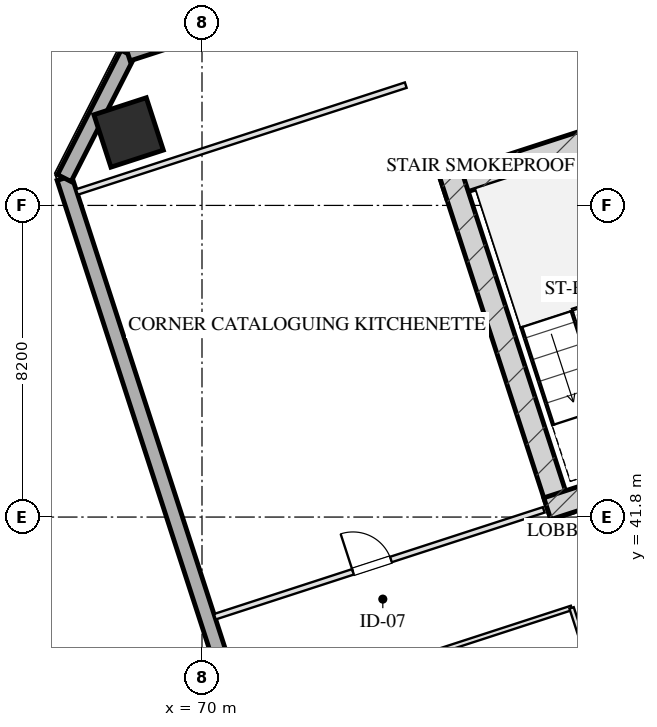
"""IFC4 building model, lengths in metres.
Left out: names, types, materials, properties, quantities, classifications, styles, units other than length and angle.
Written with IfcOpenShell. Run it as: python <this file> out.ifc"""

import sys

from ifc_helpers import new_model, si_unit, direction, frame, frame_2d, origin, origin_2d, place, context, subcontext, project, spatial, rectangle, hollow_rectangle, extrude, element, fill, save


model = new_model("IFC4")
c1 = context("Model", 3, precision=1e-05, world=origin(), true_north=direction((0.0, 1.0)))
c2 = subcontext(c1, "Body", "Model", "MODEL_VIEW")
j1 = project(units=[si_unit("LENGTHUNIT", "METRE"), si_unit("PLANEANGLEUNIT", "RADIAN")], contexts=[c1])
p1 = place(None, origin())
s1 = spatial("IfcSite", under=j1, at=p1, CompositionType="ELEMENT")
p2 = place(p1, origin())
s2 = spatial("IfcBuilding", under=s1, at=p2, CompositionType="ELEMENT")
p3 = place(p2, frame((0.0, 0.0, 117.3)))
s3 = spatial("IfcBuildingStorey", under=s2, at=p3, CompositionType="ELEMENT", Elevation=117.3)
p4 = place(p3, frame((76.344, 50.466, 0.0), z_axis=(0.0, 0.0, 1.0), x_axis=(0.951055727519, 0.309019421968, 0.0)))
e1 = element("IfcWall", 1, at=p4, inside=s3, PredefinedType="SHEAR", context=c2, shape_type="SweptSolid", body=[
    extrude(rectangle(XDim=16.4, YDim=0.6, at=frame_2d((8.2, 0.0))), origin(), (0.0, 0.0, 1.0), 3.45),
])
p5 = place(p3, frame((79.466, 41.828, 0.0), z_axis=(0.0, 0.0, 1.0), x_axis=(-0.309041232772, 0.951048640421, 0.0)))
e2 = element("IfcWall", 2, at=p5, inside=s3, PredefinedType="SHEAR", context=c2, shape_type="SweptSolid", body=[
    extrude(rectangle(XDim=9.48, YDim=0.6, at=frame_2d((4.74, 0.0))), origin(), (0.0, 0.0, 1.0), 3.45),
])
p6 = place(p3, frame((79.087, 42.021, 0.0), z_axis=(0.0, 0.0, 1.0), x_axis=(0.951062550203, 0.3089984233, 0.0)))
e3 = element("IfcWall", 3, at=p6, inside=s3, PredefinedType="SHEAR", context=c2, shape_type="SweptSolid", body=[
    extrude(rectangle(XDim=4.22, YDim=0.6, at=frame_2d((2.11, 0.0))), origin(), (0.0, 0.0, 1.0), 3.45),
])
p7 = place(p3, frame((68.069, 51.92, 0.0), z_axis=(0.0, 0.0, 1.0), x_axis=(0.951056516295, 0.309016994375, 0.0)))
e4 = element("IfcColumn", 4, at=p7, inside=s3, PredefinedType="COLUMN", context=c2, shape_type="SweptSolid", body=[
    extrude(hollow_rectangle(XDim=1.45, YDim=1.45, WallThickness=0.05, at=origin_2d()), origin(), (0.0, 0.0, 1.0), 3.451),
])
p8 = place(p3, frame((80.716, 6.59, 0.0), z_axis=(0.0, 0.0, 1.0), x_axis=(-0.309017542002, 0.95105633836, 0.0)))
e5 = element("IfcWall", 5, at=p8, inside=s3, PredefinedType="SOLIDWALL", context=c2, shape_type="SweptSolid", body=[
    extrude(rectangle(XDim=46.4, YDim=0.4, at=frame_2d((23.2, 0.0))), origin(), (0.0, 0.0, 1.0), 2.61),
])
p9 = place(p8, frame((15.6, 0.0, 0.75)))
e6 = element("IfcOpeningElement", 6, at=p9, cuts=e5, PredefinedType="OPENING", context=c2, shape_type="SweptSolid", body=[
    extrude(rectangle(XDim=2.4, YDim=1.46, at=frame_2d((1.2, 0.73))), frame((0.0, 0.21, 0.0), z_axis=(0.0, -1.0, 0.0), x_axis=(1.0, 0.0, 0.0)), (0.0, 0.0, 1.0), 0.42),
])
p10 = place(p8, frame((28.4, 0.0, 0.75)))
e7 = element("IfcOpeningElement", 7, at=p10, cuts=e5, PredefinedType="OPENING", context=c2, shape_type="SweptSolid", body=[
    extrude(rectangle(XDim=2.4, YDim=1.46, at=frame_2d((1.2, 0.73))), frame((0.0, 0.21, 0.0), z_axis=(0.0, -1.0, 0.0), x_axis=(1.0, 0.0, 0.0)), (0.0, 0.0, 1.0), 0.42),
])
p11 = place(p3, frame((66.377, 50.719, 0.0), z_axis=(0.0, 0.0, 1.0), x_axis=(0.454026238093, 0.890988313685, 0.0)))
e8 = element("IfcWall", 8, at=p11, inside=s3, PredefinedType="SOLIDWALL", context=c2, shape_type="SweptSolid", body=[
    extrude(rectangle(XDim=3.677, YDim=0.4, at=frame_2d((1.838, 0.0))), origin(), (0.0, 0.0, 1.0), 2.61),
])
p12 = place(p3, frame((68.047, 53.995, 0.0), z_axis=(0.0, 0.0, 1.0), x_axis=(0.95105505922, 0.309021478754, 0.0)))
e9 = element("IfcWall", 9, at=p12, inside=s3, PredefinedType="SOLIDWALL", context=c2, shape_type="SweptSolid", body=[
    extrude(rectangle(XDim=29.4, YDim=0.4, at=frame_2d((14.7, 0.0))), origin(), (0.0, 0.0, 1.0), 2.61),
])
p13 = place(p3, frame((66.707, 50.352, 0.0), z_axis=(0.0, 0.0, 1.0), x_axis=(0.951057133767, 0.309015093986, 0.0)))
e10 = element("IfcWall", 10, at=p13, inside=s3, PredefinedType="PARTITIONING", context=c2, shape_type="SweptSolid", body=[
    extrude(rectangle(XDim=9.1, YDim=0.15, at=frame_2d((4.55, 0.0))), origin(), (0.0, 0.0, 1.0), 3.175),
])
p14 = place(p3, frame((70.338, 39.177, 0.0), z_axis=(0.0, 0.0, 1.0), x_axis=(0.951059695568, 0.309007209409, 0.0)))
e11 = element("IfcWall", 11, at=p14, inside=s3, PredefinedType="PARTITIONING", context=c2, shape_type="SweptSolid", body=[
    extrude(rectangle(XDim=9.1, YDim=0.15, at=frame_2d((4.55, 0.0))), origin(), (0.0, 0.0, 1.0), 3.175),
])
p15 = place(p14, frame((3.822, 0.0, 0.0)))
e12 = element("IfcOpeningElement", 12, at=p15, cuts=e11, PredefinedType="OPENING", context=c2, shape_type="SweptSolid", body=[
    extrude(rectangle(XDim=1.05, YDim=2.05, at=frame_2d((0.525, 1.025))), frame((0.0, 0.085, 0.0), z_axis=(0.0, -1.0, 0.0), x_axis=(1.0, 0.0, 0.0)), (0.0, 0.0, 1.0), 0.17),
])
p16 = place(p3, frame((71.166, 36.629, 0.0), z_axis=(0.0, 0.0, 1.0), x_axis=(0.951059383421, 0.309008170129, 0.0)))
e13 = element("IfcWall", 13, at=p16, inside=s3, PredefinedType="PARTITIONING", context=c2, shape_type="SweptSolid", body=[
    extrude(rectangle(XDim=9.0, YDim=0.12, at=frame_2d((4.5, 0.0))), origin(), (0.0, 0.0, 1.0), 3.175),
])
p17 = place(p3, frame((84.867, 23.584, 0.0), z_axis=(0.0, 0.0, 1.0), x_axis=(-0.309022042254, 0.951054876125, 0.0)))
e14 = element("IfcWall", 14, at=p17, inside=s3, PredefinedType="PARTITIONING", context=c2, shape_type="SweptSolid", body=[
    extrude(rectangle(XDim=16.64, YDim=0.12, at=frame_2d((8.32, 0.0))), origin(), (0.0, 0.0, 1.0), 3.175),
])
p18 = place(p17, frame((3.06, 0.0, 0.0)))
e15 = element("IfcOpeningElement", 15, at=p18, cuts=e14, PredefinedType="OPENING", context=c2, shape_type="SweptSolid", body=[
    extrude(rectangle(XDim=1.0, YDim=2.05, at=frame_2d((0.5, 1.025))), frame((0.0, 0.07, 0.0), z_axis=(0.0, -1.0, 0.0), x_axis=(1.0, 0.0, 0.0)), (0.0, 0.0, 1.0), 0.14),
])
p19 = place(p17, frame((9.22, 0.0, 0.0)))
e16 = element("IfcOpeningElement", 16, at=p19, cuts=e14, PredefinedType="OPENING", context=c2, shape_type="SweptSolid", body=[
    extrude(rectangle(XDim=1.0, YDim=2.05, at=frame_2d((0.5, 1.025))), frame((0.0, 0.07, 0.0), z_axis=(0.0, -1.0, 0.0), x_axis=(1.0, 0.0, 0.0)), (0.0, 0.0, 1.0), 0.14),
])
p20 = place(p17, frame((13.98, 0.0, 0.0)))
e17 = element("IfcOpeningElement", 17, at=p20, cuts=e14, PredefinedType="OPENING", context=c2, shape_type="SweptSolid", body=[
    extrude(rectangle(XDim=0.85, YDim=2.05, at=frame_2d((0.425, 1.025))), frame((0.0, 0.07, 0.0), z_axis=(0.0, -1.0, 0.0), x_axis=(1.0, 0.0, 0.0)), (0.0, 0.0, 1.0), 0.14),
])
p21 = place(p15, origin())
e18 = element("IfcDoor", 18, at=p21, inside=s3, OperationType="SINGLE_SWING_LEFT", PredefinedType="DOOR", context=c2, shape_type="SweptSolid", body=[
    extrude(rectangle(XDim=1.05, YDim=2.05, at=frame_2d((0.525, 1.025))), frame((0.0, 0.025, 0.0), z_axis=(0.0, -1.0, 0.0), x_axis=(1.0, 0.0, 0.0)), (0.0, 0.0, 1.0), 0.05),
])
fill(e12, e18)
save(model, sys.argv[1])
